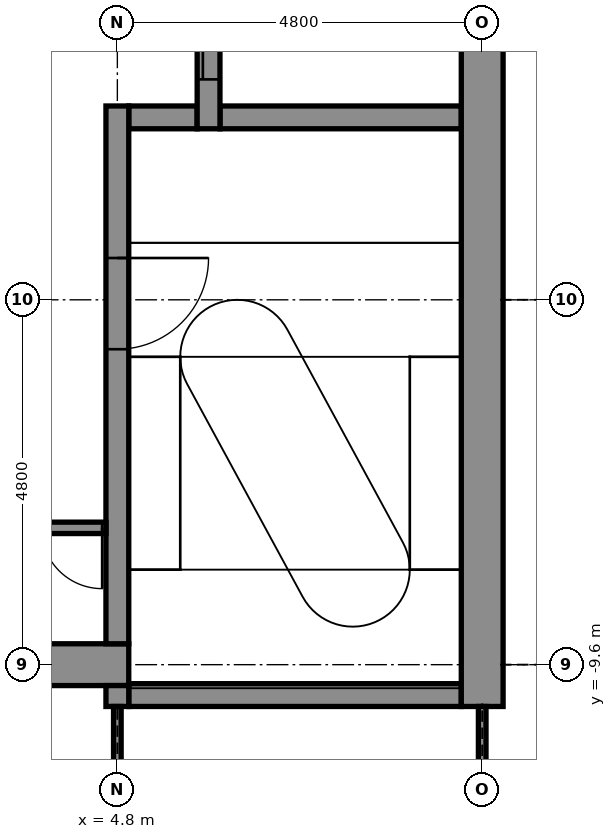
"""IFC4 building model, lengths in metres.
Left out: names, types, materials, properties, quantities, classifications, styles, units other than length and angle.
Written with IfcOpenShell. Run it as: python <this file> out.ifc"""

import sys

from ifc_helpers import new_model, si_unit, direction, frame, frame_2d, origin, place, context, subcontext, project, spatial, rectangle, extrude, element, fill, save


model = new_model("IFC4")
c1 = context("Model", 3, precision=1e-05, world=origin(), true_north=direction((0.0, 1.0)))
c2 = subcontext(c1, "Body", "Model", "MODEL_VIEW")
j1 = project(units=[si_unit("LENGTHUNIT", "METRE"), si_unit("PLANEANGLEUNIT", "RADIAN")], contexts=[c1])
p1 = place(None, origin())
s1 = spatial("IfcSite", under=j1, at=p1, CompositionType="ELEMENT")
p2 = place(p1, origin())
s2 = spatial("IfcBuilding", under=s1, at=p2, CompositionType="ELEMENT")
p3 = place(p2, frame((0.0, 0.0, 289.1)))
s3 = spatial("IfcBuildingStorey", under=s2, at=p3, CompositionType="ELEMENT", Elevation=289.1)
p4 = place(p3, frame((4.95, -10.0, -0.15), z_axis=(0.0, 0.0, 1.0), x_axis=(1.0, 0.0, 0.0)))
e1 = element("IfcWall", 1, at=p4, inside=s3, PredefinedType="STANDARD", context=c2, shape_type="SweptSolid", body=[
    extrude(rectangle(XDim=4.375, YDim=0.3, at=frame_2d((2.188, 0.0))), origin(), (0.0, 0.0, 1.0), 3.9),
])
p5 = place(p3, frame((-5.25, -9.6, -0.15), z_axis=(0.0, 0.0, 1.0), x_axis=(1.0, 0.0, 0.0)))
e2 = element("IfcWall", 2, at=p5, inside=s3, PredefinedType="SHEAR", context=c2, shape_type="SweptSolid", body=[
    extrude(rectangle(XDim=10.2, YDim=0.55, at=frame_2d((5.1, 0.0))), origin(), (0.0, 0.0, 1.0), 3.9),
])
p6 = place(p5, frame((0.6, 0.0, 0.15)))
e3 = element("IfcOpeningElement", 3, at=p6, cuts=e2, PredefinedType="OPENING", context=c2, shape_type="SweptSolid", body=[
    extrude(rectangle(XDim=0.9, YDim=2.1, at=frame_2d((0.45, 1.05))), frame((0.0, 0.285, 0.0), z_axis=(0.0, -1.0, 0.0), x_axis=(1.0, 0.0, 0.0)), (0.0, 0.0, 1.0), 0.57),
])
p7 = place(p3, frame((4.95, -2.4, -0.15), z_axis=(0.0, 0.0, 1.0), x_axis=(1.0, 0.0, 0.0)))
e4 = element("IfcWall", 4, at=p7, inside=s3, PredefinedType="STANDARD", context=c2, shape_type="SweptSolid", body=[
    extrude(rectangle(XDim=0.9, YDim=0.3, at=frame_2d((0.45, 0.0))), origin(), (0.0, 0.0, 1.0), 3.9),
])
p8 = place(p3, frame((6.15, -2.4, -0.15), z_axis=(0.0, 0.0, 1.0), x_axis=(1.0, 0.0, 0.0)))
e5 = element("IfcWall", 5, at=p8, inside=s3, PredefinedType="STANDARD", context=c2, shape_type="SweptSolid", body=[
    extrude(rectangle(XDim=3.175, YDim=0.3, at=frame_2d((1.587, 0.0))), origin(), (0.0, 0.0, 1.0), 3.9),
])
p9 = place(p3, frame((4.8, -10.15, -0.15), z_axis=(0.0, 0.0, 1.0), x_axis=(0.0, 1.0, 0.0)))
e6 = element("IfcWall", 6, at=p9, inside=s3, PredefinedType="STANDARD", context=c2, shape_type="SweptSolid", body=[
    extrude(rectangle(XDim=0.275, YDim=0.3, at=frame_2d((0.137, 0.0))), origin(), (0.0, 0.0, 1.0), 3.9),
])
p10 = place(p3, frame((4.8, -9.325, -0.15), z_axis=(0.0, 0.0, 1.0), x_axis=(0.0, 1.0, 0.0)))
e7 = element("IfcWall", 7, at=p10, inside=s3, PredefinedType="STANDARD", context=c2, shape_type="SweptSolid", body=[
    extrude(rectangle(XDim=7.075, YDim=0.3, at=frame_2d((3.538, 0.0))), origin(), (0.0, 0.0, 1.0), 3.9),
])
p11 = place(p10, frame((3.875, 0.0, 0.15)))
e8 = element("IfcOpeningElement", 8, at=p11, cuts=e7, PredefinedType="OPENING", context=c2, shape_type="SweptSolid", body=[
    extrude(rectangle(XDim=1.2, YDim=2.1, at=frame_2d((0.6, 1.05))), frame((0.0, 0.16, 0.0), z_axis=(0.0, -1.0, 0.0), x_axis=(1.0, 0.0, 0.0)), (0.0, 0.0, 1.0), 0.32),
])
p12 = place(p3, frame((6.0, -2.55, -0.15), z_axis=(0.0, 0.0, 1.0), x_axis=(0.0, 1.0, 0.0)))
e9 = element("IfcWall", 9, at=p12, inside=s3, PredefinedType="STANDARD", context=c2, shape_type="SweptSolid", body=[
    extrude(rectangle(XDim=7.5, YDim=0.3, at=frame_2d((3.75, 0.0))), origin(), (0.0, 0.0, 1.0), 3.9),
])
p13 = place(p12, frame((0.65, 0.0, 0.15)))
e10 = element("IfcOpeningElement", 10, at=p13, cuts=e9, PredefinedType="OPENING", context=c2, shape_type="SweptSolid", body=[
    extrude(rectangle(XDim=1.4, YDim=2.1, at=frame_2d((0.7, 1.05))), frame((0.0, 0.16, 0.0), z_axis=(0.0, -1.0, 0.0), x_axis=(1.0, 0.0, 0.0)), (0.0, 0.0, 1.0), 0.32),
])
p14 = place(p12, frame((3.05, 0.0, 0.15)))
e11 = element("IfcOpeningElement", 11, at=p14, cuts=e9, PredefinedType="OPENING", context=c2, shape_type="SweptSolid", body=[
    extrude(rectangle(XDim=1.4, YDim=2.1, at=frame_2d((0.7, 1.05))), frame((0.0, 0.16, 0.0), z_axis=(0.0, -1.0, 0.0), x_axis=(1.0, 0.0, 0.0)), (0.0, 0.0, 1.0), 0.32),
])
p15 = place(p12, frame((5.45, 0.0, 0.15)))
e12 = element("IfcOpeningElement", 12, at=p15, cuts=e9, PredefinedType="OPENING", context=c2, shape_type="SweptSolid", body=[
    extrude(rectangle(XDim=1.4, YDim=2.1, at=frame_2d((0.7, 1.05))), frame((0.0, 0.16, 0.0), z_axis=(0.0, -1.0, 0.0), x_axis=(1.0, 0.0, 0.0)), (0.0, 0.0, 1.0), 0.32),
])
p16 = place(p3, frame((9.6, -10.15, -0.15), z_axis=(0.0, 0.0, 1.0), x_axis=(0.0, 1.0, 0.0)))
e13 = element("IfcWall", 13, at=p16, inside=s3, PredefinedType="SHEAR", context=c2, shape_type="SweptSolid", body=[
    extrude(rectangle(XDim=20.075, YDim=0.55, at=frame_2d((10.038, 0.0))), origin(), (0.0, 0.0, 1.0), 3.9),
])
for number, where, z_axis, x_axis in (
    (14, (9.6, -13.0, 0.0), (0.0, 0.0, 1.0), (0.0, 1.0, 0.0)),
    (15, (4.8, -13.0, 0.0), (0.0, 0.0, 1.0), (0.0, 1.0, 0.0)),
):
    element("IfcWall", number, at=place(p3, frame(where, z_axis=z_axis, x_axis=x_axis)), inside=s3, PredefinedType="PARTITIONING", context=c2, shape_type="SweptSolid", body=[
        extrude(rectangle(XDim=2.85, YDim=0.1, at=frame_2d((1.425, 0.0))), origin(), (0.0, 0.0, 1.0), 3.293),
    ])
p17 = place(p3, frame((3.75, -7.8, 0.0), z_axis=(0.0, 0.0, 1.0), x_axis=(1.0, 0.0, 0.0)))
e16 = element("IfcWall", 16, at=p17, inside=s3, PredefinedType="PARTITIONING", context=c2, shape_type="SweptSolid", body=[
    extrude(rectangle(XDim=0.9, YDim=0.15, at=frame_2d((0.45, 0.0))), origin(), (0.0, 0.0, 1.0), 3.75),
])
p18 = place(p17, frame((0.05, 0.0, 0.0)))
e17 = element("IfcOpeningElement", 17, at=p18, cuts=e16, PredefinedType="OPENING", context=c2, shape_type="SweptSolid", body=[
    extrude(rectangle(XDim=0.8, YDim=2.1, at=frame_2d((0.4, 1.05))), frame((0.0, 0.085, 0.0), z_axis=(0.0, -1.0, 0.0), x_axis=(1.0, 0.0, 0.0)), (0.0, 0.0, 1.0), 0.17),
])
p19 = place(p18, frame((0.8, 0.0, 0.0), z_axis=(0.0, 0.0, 1.0), x_axis=(-1.0, 0.0, 0.0)))
e18 = element("IfcDoor", 18, at=p19, inside=s3, OperationType="SINGLE_SWING_RIGHT", PredefinedType="DOOR", context=c2, shape_type="SweptSolid", body=[
    extrude(rectangle(XDim=0.8, YDim=2.1, at=frame_2d((0.4, 1.05))), frame((0.0, 0.025, 0.0), z_axis=(0.0, -1.0, 0.0), x_axis=(1.0, 0.0, 0.0)), (0.0, 0.0, 1.0), 0.05),
])
fill(e17, e18)
p20 = place(p13, origin())
e19 = element("IfcDoor", 19, at=p20, inside=s3, OperationType="DOUBLE_DOOR_SLIDING", PredefinedType="DOOR", context=c2, shape_type="SweptSolid", body=[
    extrude(rectangle(XDim=1.4, YDim=2.1, at=frame_2d((0.7, 1.05))), frame((0.0, 0.025, 0.0), z_axis=(0.0, -1.0, 0.0), x_axis=(1.0, 0.0, 0.0)), (0.0, 0.0, 1.0), 0.05),
])
fill(e10, e19)
p21 = place(p11, frame((1.2, 0.0, 0.0), z_axis=(0.0, 0.0, 1.0), x_axis=(-1.0, 0.0, 0.0)))
e20 = element("IfcDoor", 20, at=p21, inside=s3, OperationType="SINGLE_SWING_RIGHT", PredefinedType="DOOR", context=c2, shape_type="SweptSolid", body=[
    extrude(rectangle(XDim=1.2, YDim=2.1, at=frame_2d((0.6, 1.05))), frame((0.0, 0.025, 0.0), z_axis=(0.0, -1.0, 0.0), x_axis=(1.0, 0.0, 0.0)), (0.0, 0.0, 1.0), 0.05),
])
fill(e8, e20)
save(model, sys.argv[1])
